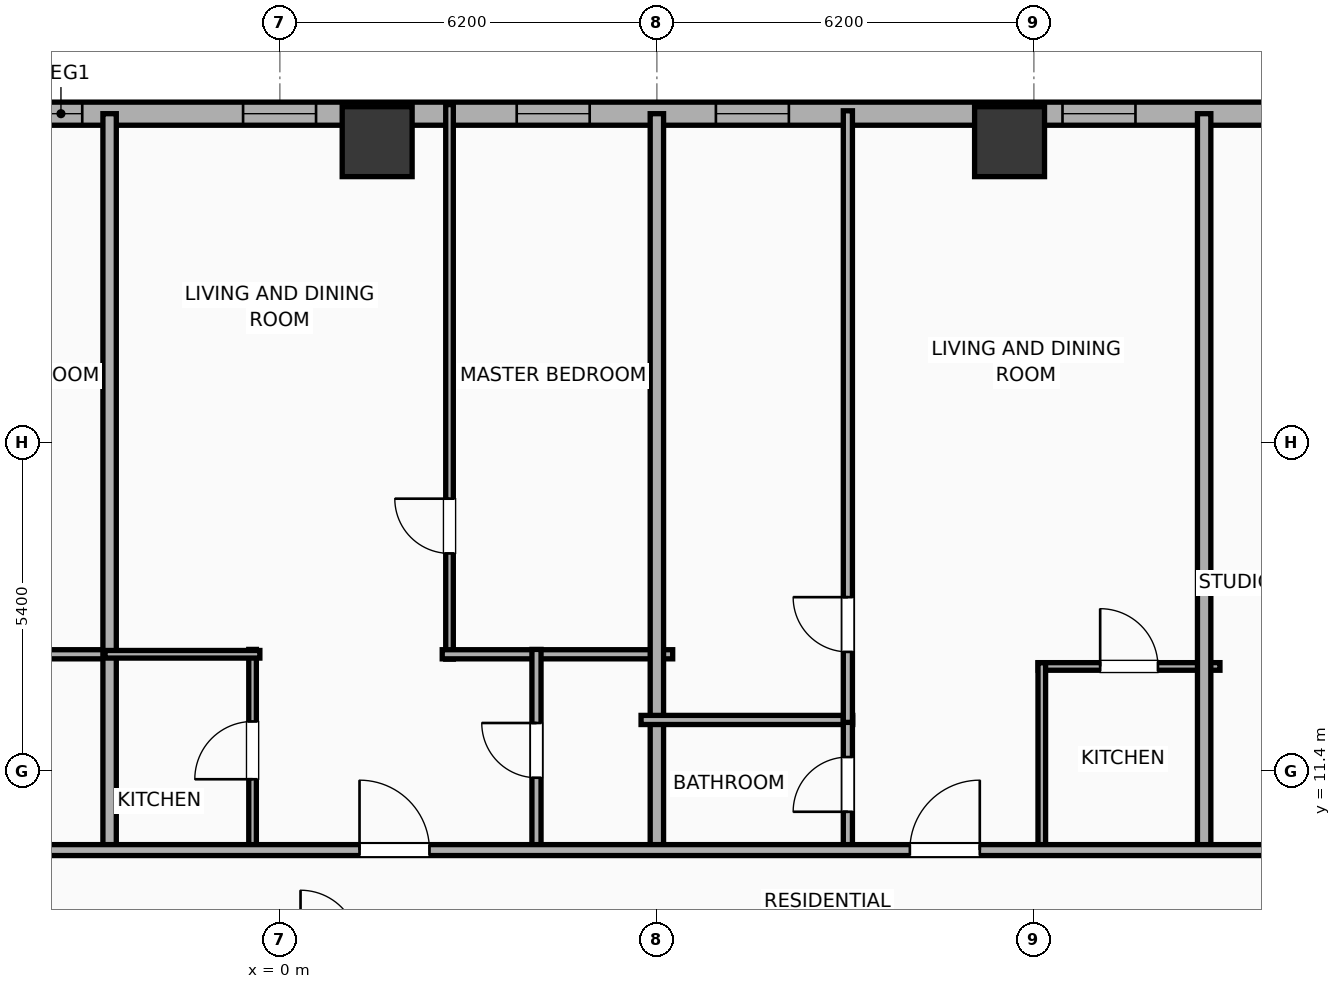
"""IFC4 building model, lengths in metres.
Left out: names, types, materials, properties, quantities, classifications, styles, units other than length and angle.
Written with IfcOpenShell. Run it as: python <this file> out.ifc"""

import sys

from ifc_helpers import new_model, si_unit, direction, frame, frame_2d, origin, origin_2d, place, context, subcontext, project, spatial, rectangle, hollow_rectangle, extrude, element, fill, save


model = new_model("IFC4")
c1 = context("Model", 3, precision=1e-05, world=origin(), true_north=direction((0.0, 1.0)))
c2 = subcontext(c1, "Body", "Model", "MODEL_VIEW")
j1 = project(units=[si_unit("LENGTHUNIT", "METRE"), si_unit("PLANEANGLEUNIT", "RADIAN")], contexts=[c1])
p1 = place(None, origin())
s1 = spatial("IfcSite", under=j1, at=p1, CompositionType="ELEMENT")
p2 = place(p1, origin())
s2 = spatial("IfcBuilding", under=s1, at=p2, CompositionType="ELEMENT")
p3 = place(p2, frame((0.0, 0.0, 68.9)))
s3 = spatial("IfcBuildingStorey", under=s2, at=p3, CompositionType="ELEMENT", Elevation=68.9)
for number, where, z_axis, x_axis in (
    (1, (12.0, 21.75, 0.0), (0.0, 0.0, 1.0), (1.0, 0.0, 0.0)),
    (2, (1.6, 21.75, 0.0), (0.0, 0.0, 1.0), (1.0, 0.0, 0.0)),
):
    element("IfcColumn", number, at=place(p3, frame(where, z_axis=z_axis, x_axis=x_axis)), inside=s3, PredefinedType="COLUMN", context=c2, shape_type="SweptSolid", body=[
        extrude(hollow_rectangle(XDim=1.15, YDim=1.15, WallThickness=0.04, at=origin_2d()), origin(), (0.0, 0.0, 1.0), 3.9),
    ])
p4 = place(p3, frame((-29.581, 22.21, 0.0), z_axis=(0.0, 0.0, 1.0), x_axis=(1.0, 0.0, 0.0)))
e3 = element("IfcWall", 3, at=p4, inside=s3, PredefinedType="ELEMENTEDWALL", context=c2, shape_type="SweptSolid", body=[
    extrude(rectangle(XDim=51.963, YDim=0.38, at=frame_2d((25.981, 0.0))), origin(), (0.0, 0.0, 1.0), 3.65),
])
p5 = place(p4, frame((5.81, 0.0, 0.75)))
e4 = element("IfcOpeningElement", 4, at=p5, cuts=e3, PredefinedType="OPENING", context=c2, shape_type="SweptSolid", body=[
    extrude(rectangle(XDim=2.4, YDim=2.1, at=frame_2d((1.2, 1.05))), frame((0.0, 0.2, 0.0), z_axis=(0.0, -1.0, 0.0), x_axis=(1.0, 0.0, 0.0)), (0.0, 0.0, 1.0), 0.4),
])
p6 = place(p4, frame((23.931, 0.0, 0.75)))
e5 = element("IfcOpeningElement", 5, at=p6, cuts=e3, PredefinedType="OPENING", context=c2, shape_type="SweptSolid", body=[
    extrude(rectangle(XDim=2.4, YDim=2.1, at=frame_2d((1.2, 1.05))), frame((0.0, 0.2, 0.0), z_axis=(0.0, -1.0, 0.0), x_axis=(1.0, 0.0, 0.0)), (0.0, 0.0, 1.0), 0.4),
])
p7 = place(p4, frame((3.056, 0.0, 0.75)))
e6 = element("IfcOpeningElement", 6, at=p7, cuts=e3, PredefinedType="OPENING", context=c2, shape_type="SweptSolid", body=[
    extrude(rectangle(XDim=1.2, YDim=2.05, at=frame_2d((0.6, 1.025))), frame((0.0, 0.2, 0.0), z_axis=(0.0, -1.0, 0.0), x_axis=(1.0, 0.0, 0.0)), (0.0, 0.0, 1.0), 0.4),
])
p8 = place(p4, frame((11.127, 0.0, 0.75)))
e7 = element("IfcOpeningElement", 7, at=p8, cuts=e3, PredefinedType="OPENING", context=c2, shape_type="SweptSolid", body=[
    extrude(rectangle(XDim=0.52, YDim=2.05, at=frame_2d((0.26, 1.025))), frame((0.0, 0.2, 0.0), z_axis=(0.0, -1.0, 0.0), x_axis=(1.0, 0.0, 0.0)), (0.0, 0.0, 1.0), 0.4),
])
p9 = place(p4, frame((14.327, 0.0, 0.75)))
e8 = element("IfcOpeningElement", 8, at=p9, cuts=e3, PredefinedType="OPENING", context=c2, shape_type="SweptSolid", body=[
    extrude(rectangle(XDim=1.2, YDim=2.05, at=frame_2d((0.6, 1.025))), frame((0.0, 0.2, 0.0), z_axis=(0.0, -1.0, 0.0), x_axis=(1.0, 0.0, 0.0)), (0.0, 0.0, 1.0), 0.4),
])
p10 = place(p4, frame((21.641, 0.0, 0.75)))
e9 = element("IfcOpeningElement", 9, at=p10, cuts=e3, PredefinedType="OPENING", context=c2, shape_type="SweptSolid", body=[
    extrude(rectangle(XDim=1.2, YDim=2.05, at=frame_2d((0.6, 1.025))), frame((0.0, 0.2, 0.0), z_axis=(0.0, -1.0, 0.0), x_axis=(1.0, 0.0, 0.0)), (0.0, 0.0, 1.0), 0.4),
])
p11 = place(p4, frame((18.486, 0.0, 0.75)))
e10 = element("IfcOpeningElement", 10, at=p11, cuts=e3, PredefinedType="OPENING", context=c2, shape_type="SweptSolid", body=[
    extrude(rectangle(XDim=1.2, YDim=2.05, at=frame_2d((0.6, 1.025))), frame((0.0, 0.2, 0.0), z_axis=(0.0, -1.0, 0.0), x_axis=(1.0, 0.0, 0.0)), (0.0, 0.0, 1.0), 0.4),
])
p12 = place(p4, frame((28.976, 0.0, 0.75)))
e11 = element("IfcOpeningElement", 11, at=p12, cuts=e3, PredefinedType="OPENING", context=c2, shape_type="SweptSolid", body=[
    extrude(rectangle(XDim=1.2, YDim=2.05, at=frame_2d((0.6, 1.025))), frame((0.0, 0.2, 0.0), z_axis=(0.0, -1.0, 0.0), x_axis=(1.0, 0.0, 0.0)), (0.0, 0.0, 1.0), 0.4),
])
p13 = place(p4, frame((33.476, 0.0, 0.75)))
e12 = element("IfcOpeningElement", 12, at=p13, cuts=e3, PredefinedType="OPENING", context=c2, shape_type="SweptSolid", body=[
    extrude(rectangle(XDim=1.2, YDim=2.05, at=frame_2d((0.6, 1.025))), frame((0.0, 0.2, 0.0), z_axis=(0.0, -1.0, 0.0), x_axis=(1.0, 0.0, 0.0)), (0.0, 0.0, 1.0), 0.4),
])
p14 = place(p4, frame((36.752, 0.0, 0.75)))
e13 = element("IfcOpeningElement", 13, at=p14, cuts=e3, PredefinedType="OPENING", context=c2, shape_type="SweptSolid", body=[
    extrude(rectangle(XDim=1.2, YDim=2.05, at=frame_2d((0.6, 1.025))), frame((0.0, 0.2, 0.0), z_axis=(0.0, -1.0, 0.0), x_axis=(1.0, 0.0, 0.0)), (0.0, 0.0, 1.0), 0.4),
])
p15 = place(p4, frame((42.452, 0.0, 0.75)))
e14 = element("IfcOpeningElement", 14, at=p15, cuts=e3, PredefinedType="OPENING", context=c2, shape_type="SweptSolid", body=[
    extrude(rectangle(XDim=1.2, YDim=2.05, at=frame_2d((0.6, 1.025))), frame((0.0, 0.2, 0.0), z_axis=(0.0, -1.0, 0.0), x_axis=(1.0, 0.0, 0.0)), (0.0, 0.0, 1.0), 0.4),
])
p16 = place(p4, frame((45.831, 0.0, 0.75)))
e15 = element("IfcOpeningElement", 15, at=p16, cuts=e3, PredefinedType="OPENING", context=c2, shape_type="SweptSolid", body=[
    extrude(rectangle(XDim=1.2, YDim=2.05, at=frame_2d((0.6, 1.025))), frame((0.0, 0.2, 0.0), z_axis=(0.0, -1.0, 0.0), x_axis=(1.0, 0.0, 0.0)), (0.0, 0.0, 1.0), 0.4),
])
p17 = place(p4, frame((48.585, 0.0, 0.75)))
e16 = element("IfcOpeningElement", 16, at=p17, cuts=e3, PredefinedType="OPENING", context=c2, shape_type="SweptSolid", body=[
    extrude(rectangle(XDim=1.2, YDim=2.05, at=frame_2d((0.6, 1.025))), frame((0.0, 0.2, 0.0), z_axis=(0.0, -1.0, 0.0), x_axis=(1.0, 0.0, 0.0)), (0.0, 0.0, 1.0), 0.4),
])
p18 = place(p4, frame((50.421, 0.0, 0.75)))
e17 = element("IfcOpeningElement", 17, at=p18, cuts=e3, PredefinedType="OPENING", context=c2, shape_type="SweptSolid", body=[
    extrude(rectangle(XDim=0.52, YDim=2.05, at=frame_2d((0.26, 1.025))), frame((0.0, 0.2, 0.0), z_axis=(0.0, -1.0, 0.0), x_axis=(1.0, 0.0, 0.0)), (0.0, 0.0, 1.0), 0.4),
])
p19 = place(p3, frame((-6.33, 13.32, 0.0), z_axis=(0.0, 0.0, 1.0), x_axis=(1.0, 0.0, 0.0)))
e18 = element("IfcWall", 18, at=p19, inside=s3, PredefinedType="PLUMBINGWALL", context=c2, shape_type="SweptSolid", body=[
    extrude(rectangle(XDim=3.605, YDim=0.15, at=frame_2d((1.802, 0.0))), origin(), (0.0, 0.0, 1.0), 3.65),
])
p20 = place(p3, frame((-2.8, 10.02, 0.0), z_axis=(0.0, 0.0, 1.0), x_axis=(0.0, 1.0, 0.0)))
e19 = element("IfcWall", 19, at=p20, inside=s3, PredefinedType="PARTITIONING", context=c2, shape_type="SweptSolid", body=[
    extrude(rectangle(XDim=12.19, YDim=0.22, at=frame_2d((6.095, 0.0))), origin(), (0.0, 0.0, 1.0), 3.65),
])
p21 = place(p3, frame((2.79, 13.24, 0.0), z_axis=(0.0, 0.0, 1.0), x_axis=(0.0, 1.0, 0.0)))
e20 = element("IfcWall", 20, at=p21, inside=s3, PredefinedType="PARTITIONING", context=c2, shape_type="SweptSolid", body=[
    extrude(rectangle(XDim=9.12, YDim=0.125, at=frame_2d((4.56, 0.0))), origin(), (0.0, 0.0, 1.0), 2.94),
])
p22 = place(p21, frame((1.739, 0.0, 0.0)))
e21 = element("IfcOpeningElement", 21, at=p22, cuts=e20, PredefinedType="OPENING", context=c2, shape_type="SweptSolid", body=[
    extrude(rectangle(XDim=0.9, YDim=2.05, at=frame_2d((0.45, 1.025))), frame((0.0, 0.073, 0.0), z_axis=(0.0, -1.0, 0.0), x_axis=(1.0, 0.0, 0.0)), (0.0, 0.0, 1.0), 0.145),
])
p23 = place(p3, frame((2.67, 13.32, 0.0), z_axis=(0.0, 0.0, 1.0), x_axis=(1.0, 0.0, 0.0)))
e22 = element("IfcWall", 22, at=p23, inside=s3, PredefinedType="PLUMBINGWALL", context=c2, shape_type="SweptSolid", body=[
    extrude(rectangle(XDim=3.79, YDim=0.15, at=frame_2d((1.895, 0.0))), origin(), (0.0, 0.0, 1.0), 3.65),
])
p24 = place(p3, frame((-0.449, 10.08, 0.0), z_axis=(0.0, 0.0, 1.0), x_axis=(0.0, 1.0, 0.0)))
e23 = element("IfcWall", 23, at=p24, inside=s3, PredefinedType="PARTITIONING", context=c2, shape_type="SweptSolid", body=[
    extrude(rectangle(XDim=3.32, YDim=0.125, at=frame_2d((1.66, 0.0))), origin(), (0.0, 0.0, 1.0), 3.65),
])
p25 = place(p24, frame((1.185, 0.0, 0.0)))
e24 = element("IfcOpeningElement", 24, at=p25, cuts=e23, PredefinedType="OPENING", context=c2, shape_type="SweptSolid", body=[
    extrude(rectangle(XDim=0.95, YDim=2.05, at=frame_2d((0.475, 1.025))), frame((0.0, 0.073, 0.0), z_axis=(0.0, -1.0, 0.0), x_axis=(1.0, 0.0, 0.0)), (0.0, 0.0, 1.0), 0.145),
])
p26 = place(p3, frame((-2.875, 13.32, 0.0), z_axis=(0.0, 0.0, 1.0), x_axis=(1.0, 0.0, 0.0)))
e25 = element("IfcWall", 25, at=p26, inside=s3, PredefinedType="PARTITIONING", context=c2, shape_type="SweptSolid", body=[
    extrude(rectangle(XDim=2.546, YDim=0.125, at=frame_2d((1.273, 0.0))), origin(), (0.0, 0.0, 1.0), 3.65),
])
p27 = place(p3, frame((4.22, 10.08, 0.0), z_axis=(0.0, 0.0, 1.0), x_axis=(0.0, 1.0, 0.0)))
e26 = element("IfcWall", 26, at=p27, inside=s3, PredefinedType="PLUMBINGWALL", context=c2, shape_type="SweptSolid", body=[
    extrude(rectangle(XDim=3.32, YDim=0.15, at=frame_2d((1.66, 0.0))), origin(), (0.0, 0.0, 1.0), 3.65),
])
p28 = place(p27, frame((1.21, 0.0, 0.0)))
e27 = element("IfcOpeningElement", 27, at=p28, cuts=e26, PredefinedType="OPENING", context=c2, shape_type="SweptSolid", body=[
    extrude(rectangle(XDim=0.9, YDim=2.05, at=frame_2d((0.45, 1.025))), frame((0.0, 0.085, 0.0), z_axis=(0.0, -1.0, 0.0), x_axis=(1.0, 0.0, 0.0)), (0.0, 0.0, 1.0), 0.17),
])
p29 = place(p3, frame((6.2, 10.02, 0.0), z_axis=(0.0, 0.0, 1.0), x_axis=(0.0, 1.0, 0.0)))
e28 = element("IfcWall", 28, at=p29, inside=s3, PredefinedType="PARTITIONING", context=c2, shape_type="SweptSolid", body=[
    extrude(rectangle(XDim=12.19, YDim=0.22, at=frame_2d((6.095, 0.0))), origin(), (0.0, 0.0, 1.0), 3.65),
])
p30 = place(p3, frame((5.94, 12.24, 0.0), z_axis=(0.0, 0.0, 1.0), x_axis=(1.0, 0.0, 0.0)))
e29 = element("IfcWall", 29, at=p30, inside=s3, PredefinedType="PLUMBINGWALL", context=c2, shape_type="SweptSolid", body=[
    extrude(rectangle(XDim=3.481, YDim=0.15, at=frame_2d((1.74, 0.0))), origin(), (0.0, 0.0, 1.0), 3.65),
])
p31 = place(p3, frame((9.341, 10.08, 0.0), z_axis=(0.0, 0.0, 1.0), x_axis=(0.0, 1.0, 0.0)))
e30 = element("IfcWall", 30, at=p31, inside=s3, PredefinedType="PLUMBINGWALL", context=c2, shape_type="SweptSolid", body=[
    extrude(rectangle(XDim=2.2, YDim=0.15, at=frame_2d((1.1, 0.0))), origin(), (0.0, 0.0, 1.0), 3.65),
])
p32 = place(p31, frame((0.65, 0.0, 0.0)))
e31 = element("IfcOpeningElement", 31, at=p32, cuts=e30, PredefinedType="OPENING", context=c2, shape_type="SweptSolid", body=[
    extrude(rectangle(XDim=0.9, YDim=2.05, at=frame_2d((0.45, 1.025))), frame((0.0, 0.085, 0.0), z_axis=(0.0, -1.0, 0.0), x_axis=(1.0, 0.0, 0.0)), (0.0, 0.0, 1.0), 0.17),
])
p33 = place(p3, frame((9.341, 12.2, 0.0), z_axis=(0.0, 0.0, 1.0), x_axis=(0.0, 1.0, 0.0)))
e32 = element("IfcWall", 32, at=p33, inside=s3, PredefinedType="PLUMBINGWALL", context=c2, shape_type="SweptSolid", body=[
    extrude(rectangle(XDim=10.058, YDim=0.15, at=frame_2d((5.029, 0.0))), origin(), (0.0, 0.0, 1.0), 3.65),
])
p34 = place(p33, frame((1.159, 0.0, 0.0)))
e33 = element("IfcOpeningElement", 33, at=p34, cuts=e32, PredefinedType="OPENING", context=c2, shape_type="SweptSolid", body=[
    extrude(rectangle(XDim=0.9, YDim=2.05, at=frame_2d((0.45, 1.025))), frame((0.0, 0.085, 0.0), z_axis=(0.0, -1.0, 0.0), x_axis=(1.0, 0.0, 0.0)), (0.0, 0.0, 1.0), 0.17),
])
p35 = place(p3, frame((12.47, 13.12, 0.0), z_axis=(0.0, 0.0, 1.0), x_axis=(1.0, 0.0, 0.0)))
e34 = element("IfcWall", 34, at=p35, inside=s3, PredefinedType="PARTITIONING", context=c2, shape_type="SweptSolid", body=[
    extrude(rectangle(XDim=2.99, YDim=0.125, at=frame_2d((1.495, 0.0))), origin(), (0.0, 0.0, 1.0), 3.65),
])
p36 = place(p35, frame((1.02, 0.0, 0.0)))
e35 = element("IfcOpeningElement", 35, at=p36, cuts=e34, PredefinedType="OPENING", context=c2, shape_type="SweptSolid", body=[
    extrude(rectangle(XDim=0.95, YDim=2.05, at=frame_2d((0.475, 1.025))), frame((0.0, 0.073, 0.0), z_axis=(0.0, -1.0, 0.0), x_axis=(1.0, 0.0, 0.0)), (0.0, 0.0, 1.0), 0.145),
])
p37 = place(p3, frame((12.53, 10.08, 0.0), z_axis=(0.0, 0.0, 1.0), x_axis=(0.0, 1.0, 0.0)))
e36 = element("IfcWall", 36, at=p37, inside=s3, PredefinedType="PARTITIONING", context=c2, shape_type="SweptSolid", body=[
    extrude(rectangle(XDim=3.1, YDim=0.125, at=frame_2d((1.55, 0.0))), origin(), (0.0, 0.0, 1.0), 2.94),
])
p38 = place(p3, frame((15.2, 10.02, 0.0), z_axis=(0.0, 0.0, 1.0), x_axis=(0.0, 1.0, 0.0)))
e37 = element("IfcWall", 37, at=p38, inside=s3, PredefinedType="PARTITIONING", context=c2, shape_type="SweptSolid", body=[
    extrude(rectangle(XDim=12.19, YDim=0.22, at=frame_2d((6.095, 0.0))), origin(), (0.0, 0.0, 1.0), 3.65),
])
p39 = place(p3, frame((-33.41, 10.1, 0.0), z_axis=(0.0, 0.0, 1.0), x_axis=(1.0, 0.0, 0.0)))
e38 = element("IfcWall", 38, at=p39, inside=s3, PredefinedType="PARTITIONING", context=c2, shape_type="SweptSolid", body=[
    extrude(rectangle(XDim=59.62, YDim=0.18, at=frame_2d((29.81, 0.0))), origin(), (0.0, 0.0, 1.0), 3.65),
])
p40 = place(p39, frame((2.793, 0.0, 0.0)))
e39 = element("IfcOpeningElement", 39, at=p40, cuts=e38, PredefinedType="OPENING", context=c2, shape_type="SweptSolid", body=[
    extrude(rectangle(XDim=0.9, YDim=2.05, at=frame_2d((0.45, 1.025))), frame((0.0, 0.1, 0.0), z_axis=(0.0, -1.0, 0.0), x_axis=(1.0, 0.0, 0.0)), (0.0, 0.0, 1.0), 0.2),
])
p41 = place(p39, frame((10.037, 0.0, 0.0)))
e40 = element("IfcOpeningElement", 40, at=p41, cuts=e38, PredefinedType="OPENING", context=c2, shape_type="SweptSolid", body=[
    extrude(rectangle(XDim=1.15, YDim=2.05, at=frame_2d((0.575, 1.025))), frame((0.0, 0.1, 0.0), z_axis=(0.0, -1.0, 0.0), x_axis=(1.0, 0.0, 0.0)), (0.0, 0.0, 1.0), 0.2),
])
p42 = place(p39, frame((16.882, 0.0, 0.0)))
e41 = element("IfcOpeningElement", 41, at=p42, cuts=e38, PredefinedType="OPENING", context=c2, shape_type="SweptSolid", body=[
    extrude(rectangle(XDim=1.15, YDim=2.05, at=frame_2d((0.575, 1.025))), frame((0.0, 0.1, 0.0), z_axis=(0.0, -1.0, 0.0), x_axis=(1.0, 0.0, 0.0)), (0.0, 0.0, 1.0), 0.2),
])
p43 = place(p39, frame((25.801, 0.0, 0.0)))
e42 = element("IfcOpeningElement", 42, at=p43, cuts=e38, PredefinedType="OPENING", context=c2, shape_type="SweptSolid", body=[
    extrude(rectangle(XDim=1.15, YDim=2.05, at=frame_2d((0.575, 1.025))), frame((0.0, 0.1, 0.0), z_axis=(0.0, -1.0, 0.0), x_axis=(1.0, 0.0, 0.0)), (0.0, 0.0, 1.0), 0.2),
])
p44 = place(p39, frame((34.72, 0.0, 0.0)))
e43 = element("IfcOpeningElement", 43, at=p44, cuts=e38, PredefinedType="OPENING", context=c2, shape_type="SweptSolid", body=[
    extrude(rectangle(XDim=1.15, YDim=2.05, at=frame_2d((0.575, 1.025))), frame((0.0, 0.1, 0.0), z_axis=(0.0, -1.0, 0.0), x_axis=(1.0, 0.0, 0.0)), (0.0, 0.0, 1.0), 0.2),
])
p45 = place(p39, frame((43.771, 0.0, 0.0)))
e44 = element("IfcOpeningElement", 44, at=p45, cuts=e38, PredefinedType="OPENING", context=c2, shape_type="SweptSolid", body=[
    extrude(rectangle(XDim=1.15, YDim=2.05, at=frame_2d((0.575, 1.025))), frame((0.0, 0.1, 0.0), z_axis=(0.0, -1.0, 0.0), x_axis=(1.0, 0.0, 0.0)), (0.0, 0.0, 1.0), 0.2),
])
p46 = place(p39, frame((49.715, 0.0, 0.0)))
e45 = element("IfcOpeningElement", 45, at=p46, cuts=e38, PredefinedType="OPENING", context=c2, shape_type="SweptSolid", body=[
    extrude(rectangle(XDim=1.15, YDim=2.05, at=frame_2d((0.575, 1.025))), frame((0.0, 0.1, 0.0), z_axis=(0.0, -1.0, 0.0), x_axis=(1.0, 0.0, 0.0)), (0.0, 0.0, 1.0), 0.2),
])
p47 = place(p39, frame((56.654, 0.0, 0.0)))
e46 = element("IfcOpeningElement", 46, at=p47, cuts=e38, PredefinedType="OPENING", context=c2, shape_type="SweptSolid", body=[
    extrude(rectangle(XDim=0.9, YDim=2.05, at=frame_2d((0.45, 1.025))), frame((0.0, 0.1, 0.0), z_axis=(0.0, -1.0, 0.0), x_axis=(1.0, 0.0, 0.0)), (0.0, 0.0, 1.0), 0.2),
])
p48 = place(p6, origin())
e47 = element("IfcWindow", 47, at=p48, inside=s3, PartitioningType="SINGLE_PANEL", PredefinedType="WINDOW", context=c2, shape_type="SweptSolid", body=[
    extrude(rectangle(XDim=2.4, YDim=2.1, at=frame_2d((1.2, 1.05))), frame((0.0, 0.03, 0.0), z_axis=(0.0, -1.0, 0.0), x_axis=(1.0, 0.0, 0.0)), (0.0, 0.0, 1.0), 0.06),
])
fill(e5, e47)
p49 = place(p12, origin())
e48 = element("IfcWindow", 48, at=p49, inside=s3, PartitioningType="SINGLE_PANEL", PredefinedType="WINDOW", context=c2, shape_type="SweptSolid", body=[
    extrude(rectangle(XDim=1.2, YDim=2.05, at=frame_2d((0.6, 1.025))), frame((0.0, 0.03, 0.0), z_axis=(0.0, -1.0, 0.0), x_axis=(1.0, 0.0, 0.0)), (0.0, 0.0, 1.0), 0.06),
])
fill(e11, e48)
p50 = place(p13, origin())
e49 = element("IfcWindow", 49, at=p50, inside=s3, PartitioningType="SINGLE_PANEL", PredefinedType="WINDOW", context=c2, shape_type="SweptSolid", body=[
    extrude(rectangle(XDim=1.2, YDim=2.05, at=frame_2d((0.6, 1.025))), frame((0.0, 0.03, 0.0), z_axis=(0.0, -1.0, 0.0), x_axis=(1.0, 0.0, 0.0)), (0.0, 0.0, 1.0), 0.06),
])
fill(e12, e49)
p51 = place(p14, origin())
e50 = element("IfcWindow", 50, at=p51, inside=s3, PartitioningType="SINGLE_PANEL", PredefinedType="WINDOW", context=c2, shape_type="SweptSolid", body=[
    extrude(rectangle(XDim=1.2, YDim=2.05, at=frame_2d((0.6, 1.025))), frame((0.0, 0.03, 0.0), z_axis=(0.0, -1.0, 0.0), x_axis=(1.0, 0.0, 0.0)), (0.0, 0.0, 1.0), 0.06),
])
fill(e13, e50)
p52 = place(p15, origin())
e51 = element("IfcWindow", 51, at=p52, inside=s3, PartitioningType="SINGLE_PANEL", PredefinedType="WINDOW", context=c2, shape_type="SweptSolid", body=[
    extrude(rectangle(XDim=1.2, YDim=2.05, at=frame_2d((0.6, 1.025))), frame((0.0, 0.03, 0.0), z_axis=(0.0, -1.0, 0.0), x_axis=(1.0, 0.0, 0.0)), (0.0, 0.0, 1.0), 0.06),
])
fill(e14, e51)
p53 = place(p22, origin())
e52 = element("IfcDoor", 52, at=p53, inside=s3, OperationType="SINGLE_SWING_RIGHT", PredefinedType="DOOR", context=c2, shape_type="SweptSolid", body=[
    extrude(rectangle(XDim=0.9, YDim=2.05, at=frame_2d((0.45, 1.025))), frame((0.0, 0.025, 0.0), z_axis=(0.0, -1.0, 0.0), x_axis=(1.0, 0.0, 0.0)), (0.0, 0.0, 1.0), 0.05),
])
fill(e21, e52)
p54 = place(p25, origin())
e53 = element("IfcDoor", 53, at=p54, inside=s3, OperationType="SINGLE_SWING_LEFT", PredefinedType="DOOR", context=c2, shape_type="SweptSolid", body=[
    extrude(rectangle(XDim=0.95, YDim=2.05, at=frame_2d((0.475, 1.025))), frame((0.0, 0.025, 0.0), z_axis=(0.0, -1.0, 0.0), x_axis=(1.0, 0.0, 0.0)), (0.0, 0.0, 1.0), 0.05),
])
fill(e24, e53)
p55 = place(p28, origin())
e54 = element("IfcDoor", 54, at=p55, inside=s3, OperationType="SINGLE_SWING_RIGHT", PredefinedType="DOOR", context=c2, shape_type="SweptSolid", body=[
    extrude(rectangle(XDim=0.9, YDim=2.05, at=frame_2d((0.45, 1.025))), frame((0.0, 0.025, 0.0), z_axis=(0.0, -1.0, 0.0), x_axis=(1.0, 0.0, 0.0)), (0.0, 0.0, 1.0), 0.05),
])
fill(e27, e54)
p56 = place(p32, origin())
e55 = element("IfcDoor", 55, at=p56, inside=s3, OperationType="SINGLE_SWING_LEFT", PredefinedType="DOOR", context=c2, shape_type="SweptSolid", body=[
    extrude(rectangle(XDim=0.9, YDim=2.05, at=frame_2d((0.45, 1.025))), frame((0.0, 0.025, 0.0), z_axis=(0.0, -1.0, 0.0), x_axis=(1.0, 0.0, 0.0)), (0.0, 0.0, 1.0), 0.05),
])
fill(e31, e55)
p57 = place(p34, origin())
e56 = element("IfcDoor", 56, at=p57, inside=s3, OperationType="SINGLE_SWING_RIGHT", PredefinedType="DOOR", context=c2, shape_type="SweptSolid", body=[
    extrude(rectangle(XDim=0.9, YDim=2.05, at=frame_2d((0.45, 1.025))), frame((0.0, 0.025, 0.0), z_axis=(0.0, -1.0, 0.0), x_axis=(1.0, 0.0, 0.0)), (0.0, 0.0, 1.0), 0.05),
])
fill(e33, e56)
p58 = place(p36, origin())
e57 = element("IfcDoor", 57, at=p58, inside=s3, OperationType="SINGLE_SWING_LEFT", PredefinedType="DOOR", context=c2, shape_type="SweptSolid", body=[
    extrude(rectangle(XDim=0.95, YDim=2.05, at=frame_2d((0.475, 1.025))), frame((0.0, 0.025, 0.0), z_axis=(0.0, -1.0, 0.0), x_axis=(1.0, 0.0, 0.0)), (0.0, 0.0, 1.0), 0.05),
])
fill(e35, e57)
p59 = place(p44, origin())
e58 = element("IfcDoor", 58, at=p59, inside=s3, OperationType="SINGLE_SWING_LEFT", PredefinedType="DOOR", context=c2, shape_type="SweptSolid", body=[
    extrude(rectangle(XDim=1.15, YDim=2.05, at=frame_2d((0.575, 1.025))), frame((0.0, 0.025, 0.0), z_axis=(0.0, -1.0, 0.0), x_axis=(1.0, 0.0, 0.0)), (0.0, 0.0, 1.0), 0.05),
])
fill(e43, e58)
p60 = place(p45, origin())
e59 = element("IfcDoor", 59, at=p60, inside=s3, OperationType="SINGLE_SWING_RIGHT", PredefinedType="DOOR", context=c2, shape_type="SweptSolid", body=[
    extrude(rectangle(XDim=1.15, YDim=2.05, at=frame_2d((0.575, 1.025))), frame((0.0, 0.025, 0.0), z_axis=(0.0, -1.0, 0.0), x_axis=(1.0, 0.0, 0.0)), (0.0, 0.0, 1.0), 0.05),
])
fill(e44, e59)
save(model, sys.argv[1])
